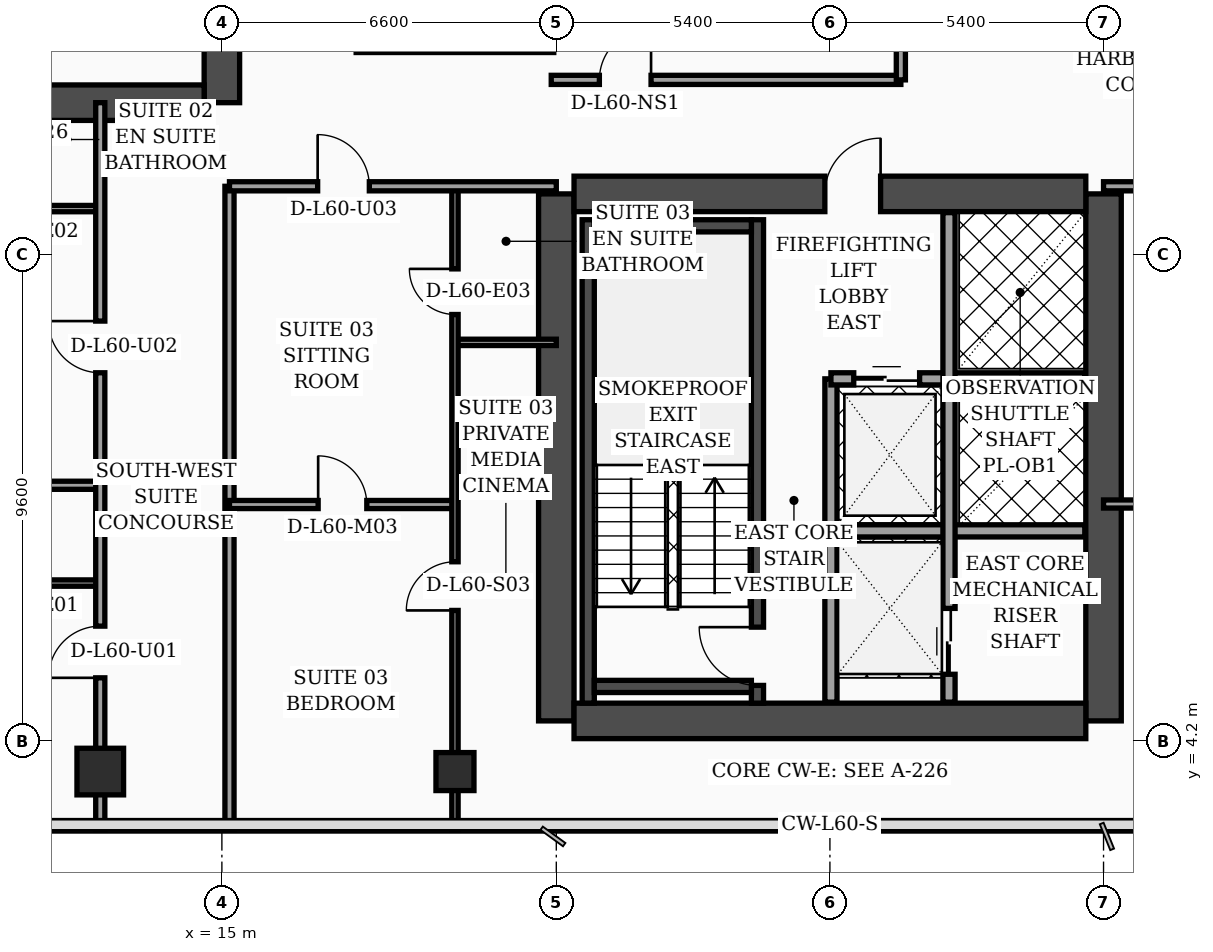
"""IFC4 building model, lengths in metres.
Left out: names, types, materials, properties, quantities, classifications, styles, units other than length and angle.
Written with IfcOpenShell. Run it as: python <this file> out.ifc"""

import sys

from ifc_helpers import new_model, si_unit, direction, frame, frame_2d, origin, origin_2d, place, context, subcontext, project, spatial, rectangle, hollow_rectangle, extrude, element, fill, save


model = new_model("IFC4")
c1 = context("Model", 3, precision=1e-05, world=origin(), true_north=direction((0.0, 1.0)))
c2 = subcontext(c1, "Body", "Model", "MODEL_VIEW")
j1 = project(units=[si_unit("LENGTHUNIT", "METRE"), si_unit("PLANEANGLEUNIT", "RADIAN")], contexts=[c1])
p1 = place(None, origin())
s1 = spatial("IfcSite", under=j1, at=p1, CompositionType="ELEMENT")
p2 = place(p1, origin())
s2 = spatial("IfcBuilding", under=s1, at=p2, CompositionType="ELEMENT")
p3 = place(p2, frame((0.0, 0.0, 243.8)))
s3 = spatial("IfcBuildingStorey", under=s2, at=p3, CompositionType="ELEMENT", Elevation=243.8)
p4 = place(p3, frame((15.0, 16.8, 0.0), z_axis=(0.0, 0.0, 1.0), x_axis=(0.0, 1.0, 0.0)))
e1 = element("IfcWall", 1, at=p4, inside=s3, PredefinedType="SHEAR", context=c2, shape_type="SweptSolid", body=[
    extrude(rectangle(XDim=21.6, YDim=0.7, at=frame_2d((10.8, 0.0))), origin(), (0.0, 0.0, 1.0), 3.56),
])
p5 = place(p4, frame((8.65, 0.0, 0.0)))
e2 = element("IfcOpeningElement", 2, at=p5, cuts=e1, PredefinedType="OPENING", context=c2, shape_type="SweptSolid", body=[
    extrude(rectangle(XDim=1.1, YDim=2.2, at=frame_2d((0.55, 1.1))), frame((0.0, 0.36, 0.0), z_axis=(0.0, -1.0, 0.0), x_axis=(1.0, 0.0, 0.0)), (0.0, 0.0, 1.0), 0.72),
])
p6 = place(p4, frame((18.9, 0.0, 0.0)))
e3 = element("IfcOpeningElement", 3, at=p6, cuts=e1, PredefinedType="OPENING", context=c2, shape_type="SweptSolid", body=[
    extrude(rectangle(XDim=1.1, YDim=2.2, at=frame_2d((0.55, 1.1))), frame((0.0, 0.36, 0.0), z_axis=(0.0, -1.0, 0.0), x_axis=(1.0, 0.0, 0.0)), (0.0, 0.0, 1.0), 0.72),
])
p7 = place(p3, frame((4.55, 16.8, 0.0), z_axis=(0.0, 0.0, 1.0), x_axis=(1.0, 0.0, 0.0)))
e4 = element("IfcWall", 4, at=p7, inside=s3, PredefinedType="SHEAR", context=c2, shape_type="SweptSolid", body=[
    extrude(rectangle(XDim=10.1, YDim=0.7, at=frame_2d((5.05, 0.0))), origin(), (0.0, 0.0, 1.0), 3.56),
])
for number, where, z_axis, x_axis in (
    (5, (21.6, 4.6, 0.0), (0.0, 0.0, 1.0), (0.0, 1.0, 0.0)),
    (6, (32.4, 4.6, 0.0), (0.0, 0.0, 1.0), (0.0, 1.0, 0.0)),
):
    element("IfcWall", number, at=place(p3, frame(where, z_axis=z_axis, x_axis=x_axis)), inside=s3, PredefinedType="SHEAR", context=c2, shape_type="SweptSolid", body=[
        extrude(rectangle(XDim=10.4, YDim=0.7, at=frame_2d((5.2, 0.0))), origin(), (0.0, 0.0, 1.0), 3.56),
    ])
p8 = place(p3, frame((21.95, 15.0, 0.0), z_axis=(0.0, 0.0, 1.0), x_axis=(1.0, 0.0, 0.0)))
e7 = element("IfcWall", 7, at=p8, inside=s3, PredefinedType="SHEAR", context=c2, shape_type="SweptSolid", body=[
    extrude(rectangle(XDim=10.1, YDim=0.7, at=frame_2d((5.05, 0.0))), origin(), (0.0, 0.0, 1.0), 3.56),
])
p9 = place(p8, frame((4.95, 0.0, 0.0)))
e8 = element("IfcOpeningElement", 8, at=p9, cuts=e7, PredefinedType="OPENING", context=c2, shape_type="SweptSolid", body=[
    extrude(rectangle(XDim=1.1, YDim=2.2, at=frame_2d((0.55, 1.1))), frame((0.0, 0.36, 0.0), z_axis=(0.0, -1.0, 0.0), x_axis=(1.0, 0.0, 0.0)), (0.0, 0.0, 1.0), 0.72),
])
p10 = place(p3, frame((21.95, 4.6, 0.0), z_axis=(0.0, 0.0, 1.0), x_axis=(1.0, 0.0, 0.0)))
e9 = element("IfcWall", 9, at=p10, inside=s3, PredefinedType="SHEAR", context=c2, shape_type="SweptSolid", body=[
    extrude(rectangle(XDim=10.1, YDim=0.7, at=frame_2d((5.05, 0.0))), origin(), (0.0, 0.0, 1.0), 3.56),
])
p11 = place(p3, frame((22.23, 4.95, 0.0), z_axis=(0.0, 0.0, 1.0), x_axis=(0.0, 1.0, 0.0)))
e10 = element("IfcWall", 10, at=p11, inside=s3, PredefinedType="SOLIDWALL", context=c2, shape_type="SweptSolid", body=[
    extrude(rectangle(XDim=9.54, YDim=0.24, at=frame_2d((4.77, 0.0))), origin(), (0.0, 0.0, 1.0), 3.56),
])
p12 = place(p3, frame((25.57, 4.95, 0.0), z_axis=(0.0, 0.0, 1.0), x_axis=(0.0, 1.0, 0.0)))
e11 = element("IfcWall", 11, at=p12, inside=s3, PredefinedType="SOLIDWALL", context=c2, shape_type="SweptSolid", body=[
    extrude(rectangle(XDim=9.54, YDim=0.24, at=frame_2d((4.77, 0.0))), origin(), (0.0, 0.0, 1.0), 3.56),
])
p13 = place(p12, frame((0.35, 0.0, 0.0)))
e12 = element("IfcOpeningElement", 12, at=p13, cuts=e11, PredefinedType="OPENING", context=c2, shape_type="SweptSolid", body=[
    extrude(rectangle(XDim=1.15, YDim=2.2, at=frame_2d((0.575, 1.1))), frame((0.0, 0.13, 0.0), z_axis=(0.0, -1.0, 0.0), x_axis=(1.0, 0.0, 0.0)), (0.0, 0.0, 1.0), 0.26),
])
for number, where, z_axis, x_axis in (
    (13, (22.35, 5.28, 0.0), (0.0, 0.0, 1.0), (1.0, 0.0, 0.0)),
    (14, (22.35, 14.37, 0.0), (0.0, 0.0, 1.0), (1.0, 0.0, 0.0)),
):
    element("IfcWall", number, at=place(p3, frame(where, z_axis=z_axis, x_axis=x_axis)), inside=s3, PredefinedType="SOLIDWALL", context=c2, shape_type="SweptSolid", body=[
        extrude(rectangle(XDim=3.1, YDim=0.24, at=frame_2d((1.55, 0.0))), origin(), (0.0, 0.0, 1.0), 3.56),
    ])
p14 = place(p3, frame((12.6, 3.6, 0.0), z_axis=(0.0, 0.0, 1.0), x_axis=(1.0, 0.0, 0.0)))
e15 = element("IfcColumn", 15, at=p14, inside=s3, PredefinedType="COLUMN", context=c2, shape_type="SweptSolid", body=[
    extrude(rectangle(XDim=0.92, YDim=0.92, at=origin_2d()), origin(), (0.0, 0.0, 1.0), 3.56),
])
p15 = place(p3, frame((19.6, 3.6, 0.0), z_axis=(0.0, 0.0, 1.0), x_axis=(1.0, 0.0, 0.0)))
e16 = element("IfcColumn", 16, at=p15, inside=s3, PredefinedType="COLUMN", context=c2, shape_type="SweptSolid", body=[
    extrude(hollow_rectangle(XDim=0.75, YDim=0.75, WallThickness=0.032, at=origin_2d()), origin(), (0.0, 0.0, 1.0), 3.56),
])
p16 = place(p3, frame((27.02, 4.97, 0.0), z_axis=(0.0, 0.0, 1.0), x_axis=(0.0, 1.0, 0.0)))
e17 = element("IfcWall", 17, at=p16, inside=s3, PredefinedType="SOLIDWALL", context=c2, shape_type="SweptSolid", body=[
    extrude(rectangle(XDim=6.38, YDim=0.24, at=frame_2d((3.19, 0.0))), origin(), (0.0, 0.0, 1.0), 3.56),
])
p17 = place(p3, frame((27.02, 11.35, 0.0), z_axis=(0.0, 0.0, 1.0), x_axis=(1.0, 0.0, 0.0)))
e18 = element("IfcWall", 18, at=p17, inside=s3, PredefinedType="SOLIDWALL", context=c2, shape_type="SweptSolid", body=[
    extrude(rectangle(XDim=5.01, YDim=0.24, at=frame_2d((2.505, 0.0))), origin(), (0.0, 0.0, 1.0), 3.56),
])
p18 = place(p17, frame((0.45, 0.0, 0.0)))
e19 = element("IfcOpeningElement", 19, at=p18, cuts=e18, PredefinedType="OPENING", context=c2, shape_type="SweptSolid", body=[
    extrude(rectangle(XDim=1.3, YDim=2.35, at=frame_2d((0.65, 1.175))), frame((0.0, 0.13, 0.0), z_axis=(0.0, -1.0, 0.0), x_axis=(1.0, 0.0, 0.0)), (0.0, 0.0, 1.0), 0.26),
])
p19 = place(p3, frame((27.02, 8.35, 0.0), z_axis=(0.0, 0.0, 1.0), x_axis=(1.0, 0.0, 0.0)))
e20 = element("IfcWall", 20, at=p19, inside=s3, PredefinedType="SOLIDWALL", context=c2, shape_type="SweptSolid", body=[
    extrude(rectangle(XDim=5.01, YDim=0.24, at=frame_2d((2.505, 0.0))), origin(), (0.0, 0.0, 1.0), 3.56),
])
p20 = place(p3, frame((29.35, 4.97, 0.0), z_axis=(0.0, 0.0, 1.0), x_axis=(0.0, 1.0, 0.0)))
e21 = element("IfcWall", 21, at=p20, inside=s3, PredefinedType="SOLIDWALL", context=c2, shape_type="SweptSolid", body=[
    extrude(rectangle(XDim=9.66, YDim=0.24, at=frame_2d((4.83, 0.0))), origin(), (0.0, 0.0, 1.0), 3.56),
])
p21 = place(p20, frame((0.55, 0.0, 0.0)))
e22 = element("IfcOpeningElement", 22, at=p21, cuts=e21, PredefinedType="OPENING", context=c2, shape_type="SweptSolid", body=[
    extrude(rectangle(XDim=1.3, YDim=2.35, at=frame_2d((0.65, 1.175))), frame((0.0, 0.13, 0.0), z_axis=(0.0, -1.0, 0.0), x_axis=(1.0, 0.0, 0.0)), (0.0, 0.0, 1.0), 0.26),
])
p22 = place(p3, frame((3.2, 7.32, 0.0), z_axis=(0.0, 0.0, 1.0), x_axis=(1.0, 0.0, 0.0)))
e23 = element("IfcWall", 23, at=p22, inside=s3, PredefinedType="PARTITIONING", context=c2, shape_type="SweptSolid", body=[
    extrude(rectangle(XDim=9.4, YDim=0.125, at=frame_2d((4.7, 0.0))), origin(), (0.0, 0.0, 1.0), 2.99),
])
p23 = place(p22, frame((3.3, 0.0, 0.0)))
e24 = element("IfcOpeningElement", 24, at=p23, cuts=e23, PredefinedType="OPENING", context=c2, shape_type="SweptSolid", body=[
    extrude(rectangle(XDim=0.96, YDim=2.2, at=frame_2d((0.48, 1.1))), frame((0.0, 0.073, 0.0), z_axis=(0.0, -1.0, 0.0), x_axis=(1.0, 0.0, 0.0)), (0.0, 0.0, 1.0), 0.145),
])
p24 = place(p22, frame((7.49, 0.0, 0.0)))
e25 = element("IfcOpeningElement", 25, at=p24, cuts=e23, PredefinedType="OPENING", context=c2, shape_type="SweptSolid", body=[
    extrude(rectangle(XDim=0.9, YDim=2.15, at=frame_2d((0.45, 1.075))), frame((0.0, 0.073, 0.0), z_axis=(0.0, -1.0, 0.0), x_axis=(1.0, 0.0, 0.0)), (0.0, 0.0, 1.0), 0.145),
])
p25 = place(p3, frame((0.08, 14.71, 0.0), z_axis=(0.0, 0.0, 1.0), x_axis=(1.0, 0.0, 0.0)))
e26 = element("IfcWall", 26, at=p25, inside=s3, PredefinedType="PARTITIONING", context=c2, shape_type="SweptSolid", body=[
    extrude(rectangle(XDim=12.52, YDim=0.125, at=frame_2d((6.26, 0.0))), origin(), (0.0, 0.0, 1.0), 2.99),
])
p26 = place(p25, frame((4.32, 0.0, 0.0)))
e27 = element("IfcOpeningElement", 27, at=p26, cuts=e26, PredefinedType="OPENING", context=c2, shape_type="SweptSolid", body=[
    extrude(rectangle(XDim=0.96, YDim=2.2, at=frame_2d((0.48, 1.1))), frame((0.0, 0.073, 0.0), z_axis=(0.0, -1.0, 0.0), x_axis=(1.0, 0.0, 0.0)), (0.0, 0.0, 1.0), 0.145),
])
p27 = place(p25, frame((10.61, 0.0, 0.0)))
e28 = element("IfcOpeningElement", 28, at=p27, cuts=e26, PredefinedType="OPENING", context=c2, shape_type="SweptSolid", body=[
    extrude(rectangle(XDim=0.9, YDim=2.15, at=frame_2d((0.45, 1.075))), frame((0.0, 0.073, 0.0), z_axis=(0.0, -1.0, 0.0), x_axis=(1.0, 0.0, 0.0)), (0.0, 0.0, 1.0), 0.145),
])
p28 = place(p3, frame((0.08, 9.25, 0.0), z_axis=(0.0, 0.0, 1.0), x_axis=(1.0, 0.0, 0.0)))
e29 = element("IfcWall", 29, at=p28, inside=s3, PredefinedType="PARTITIONING", context=c2, shape_type="SweptSolid", body=[
    extrude(rectangle(XDim=12.52, YDim=0.16, at=frame_2d((6.26, 0.0))), origin(), (0.0, 0.0, 1.0), 2.99),
])
p29 = place(p3, frame((12.6, 2.44, 0.0), z_axis=(0.0, 0.0, 1.0), x_axis=(0.0, 1.0, 0.0)))
e30 = element("IfcWall", 30, at=p29, inside=s3, PredefinedType="PARTITIONING", context=c2, shape_type="SweptSolid", body=[
    extrude(rectangle(XDim=14.36, YDim=0.18, at=frame_2d((7.18, 0.0))), origin(), (0.0, 0.0, 1.0), 2.99),
])
p30 = place(p29, frame((3.01, 0.0, 0.0)))
e31 = element("IfcOpeningElement", 31, at=p30, cuts=e30, PredefinedType="OPENING", context=c2, shape_type="SweptSolid", body=[
    extrude(rectangle(XDim=1.02, YDim=2.2, at=frame_2d((0.51, 1.1))), frame((0.0, 0.1, 0.0), z_axis=(0.0, -1.0, 0.0), x_axis=(1.0, 0.0, 0.0)), (0.0, 0.0, 1.0), 0.2),
])
p31 = place(p29, frame((9.03, 0.0, 0.0)))
e32 = element("IfcOpeningElement", 32, at=p31, cuts=e30, PredefinedType="OPENING", context=c2, shape_type="SweptSolid", body=[
    extrude(rectangle(XDim=1.02, YDim=2.2, at=frame_2d((0.51, 1.1))), frame((0.0, 0.1, 0.0), z_axis=(0.0, -1.0, 0.0), x_axis=(1.0, 0.0, 0.0)), (0.0, 0.0, 1.0), 0.2),
])
p32 = place(p3, frame((15.15, 2.44, 0.0), z_axis=(0.0, 0.0, 1.0), x_axis=(0.0, 1.0, 0.0)))
e33 = element("IfcWall", 33, at=p32, inside=s3, PredefinedType="PARTITIONING", context=c2, shape_type="SweptSolid", body=[
    extrude(rectangle(XDim=12.71, YDim=0.18, at=frame_2d((6.355, 0.0))), origin(), (0.0, 0.0, 1.0), 3.09),
])
p33 = place(p3, frame((19.6, 12.07, 0.0), z_axis=(0.0, 0.0, 1.0), x_axis=(1.0, 0.0, 0.0)))
e34 = element("IfcWall", 34, at=p33, inside=s3, PredefinedType="PARTITIONING", context=c2, shape_type="SweptSolid", body=[
    extrude(rectangle(XDim=2.0, YDim=0.125, at=frame_2d((1.0, 0.0))), origin(), (0.0, 0.0, 1.0), 3.56),
])
p34 = place(p3, frame((15.15, 8.87, 0.0), z_axis=(0.0, 0.0, 1.0), x_axis=(1.0, 0.0, 0.0)))
e35 = element("IfcWall", 35, at=p34, inside=s3, PredefinedType="PARTITIONING", context=c2, shape_type="SweptSolid", body=[
    extrude(rectangle(XDim=4.45, YDim=0.16, at=frame_2d((2.225, 0.0))), origin(), (0.0, 0.0, 1.0), 3.56),
])
p35 = place(p34, frame((1.75, 0.0, 0.0)))
e36 = element("IfcOpeningElement", 36, at=p35, cuts=e35, PredefinedType="OPENING", context=c2, shape_type="SweptSolid", body=[
    extrude(rectangle(XDim=0.96, YDim=2.2, at=frame_2d((0.48, 1.1))), frame((0.0, 0.09, 0.0), z_axis=(0.0, -1.0, 0.0), x_axis=(1.0, 0.0, 0.0)), (0.0, 0.0, 1.0), 0.18),
])
p36 = place(p3, frame((19.6, 2.44, 0.0), z_axis=(0.0, 0.0, 1.0), x_axis=(0.0, 1.0, 0.0)))
e37 = element("IfcWall", 37, at=p36, inside=s3, PredefinedType="PARTITIONING", context=c2, shape_type="SweptSolid", body=[
    extrude(rectangle(XDim=12.71, YDim=0.125, at=frame_2d((6.355, 0.0))), origin(), (0.0, 0.0, 1.0), 2.59),
])
p37 = place(p36, frame((4.34, 0.0, 0.0)))
e38 = element("IfcOpeningElement", 38, at=p37, cuts=e37, PredefinedType="OPENING", context=c2, shape_type="SweptSolid", body=[
    extrude(rectangle(XDim=0.96, YDim=2.2, at=frame_2d((0.48, 1.1))), frame((0.0, 0.073, 0.0), z_axis=(0.0, -1.0, 0.0), x_axis=(1.0, 0.0, 0.0)), (0.0, 0.0, 1.0), 0.145),
])
p38 = place(p36, frame((10.18, 0.0, 0.0)))
e39 = element("IfcOpeningElement", 39, at=p38, cuts=e37, PredefinedType="OPENING", context=c2, shape_type="SweptSolid", body=[
    extrude(rectangle(XDim=0.9, YDim=2.15, at=frame_2d((0.45, 1.075))), frame((0.0, 0.073, 0.0), z_axis=(0.0, -1.0, 0.0), x_axis=(1.0, 0.0, 0.0)), (0.0, 0.0, 1.0), 0.145),
])
p39 = place(p3, frame((15.15, 15.15, 0.0), z_axis=(0.0, 0.0, 1.0), x_axis=(1.0, 0.0, 0.0)))
e40 = element("IfcWall", 40, at=p39, inside=s3, PredefinedType="PARTITIONING", context=c2, shape_type="SweptSolid", body=[
    extrude(rectangle(XDim=6.45, YDim=0.18, at=frame_2d((3.225, 0.0))), origin(), (0.0, 0.0, 1.0), 2.59),
])
p40 = place(p39, frame((1.74, 0.0, 0.0)))
e41 = element("IfcOpeningElement", 41, at=p40, cuts=e40, PredefinedType="OPENING", context=c2, shape_type="SweptSolid", body=[
    extrude(rectangle(XDim=1.02, YDim=2.2, at=frame_2d((0.51, 1.1))), frame((0.0, 0.1, 0.0), z_axis=(0.0, -1.0, 0.0), x_axis=(1.0, 0.0, 0.0)), (0.0, 0.0, 1.0), 0.2),
])
p41 = place(p3, frame((17.65, 17.88, 0.0), z_axis=(0.0, 0.0, 1.0), x_axis=(1.0, 0.0, 0.0)))
e42 = element("IfcWall", 42, at=p41, inside=s3, PredefinedType="PARTITIONING", context=c2, shape_type="SweptSolid", body=[
    extrude(rectangle(XDim=3.9, YDim=0.18, at=frame_2d((1.95, 0.0))), origin(), (0.0, 0.0, 1.0), 3.09),
])
p42 = place(p3, frame((32.4, 8.88, 0.0), z_axis=(0.0, 0.0, 1.0), x_axis=(1.0, 0.0, 0.0)))
e43 = element("IfcWall", 43, at=p42, inside=s3, PredefinedType="PARTITIONING", context=c2, shape_type="SweptSolid", body=[
    extrude(rectangle(XDim=5.2, YDim=0.16, at=frame_2d((2.6, 0.0))), origin(), (0.0, 0.0, 1.0), 2.99),
])
p43 = place(p42, frame((2.12, 0.0, 0.0)))
e44 = element("IfcOpeningElement", 44, at=p43, cuts=e43, PredefinedType="OPENING", context=c2, shape_type="SweptSolid", body=[
    extrude(rectangle(XDim=0.96, YDim=2.2, at=frame_2d((0.48, 1.1))), frame((0.0, 0.09, 0.0), z_axis=(0.0, -1.0, 0.0), x_axis=(1.0, 0.0, 0.0)), (0.0, 0.0, 1.0), 0.18),
])
p44 = place(p3, frame((32.4, 15.15, 0.0), z_axis=(0.0, 0.0, 1.0), x_axis=(1.0, 0.0, 0.0)))
e45 = element("IfcWall", 45, at=p44, inside=s3, PredefinedType="PARTITIONING", context=c2, shape_type="SweptSolid", body=[
    extrude(rectangle(XDim=7.2, YDim=0.18, at=frame_2d((3.6, 0.0))), origin(), (0.0, 0.0, 1.0), 2.99),
])
p45 = place(p44, frame((2.19, 0.0, 0.0)))
e46 = element("IfcOpeningElement", 46, at=p45, cuts=e45, PredefinedType="OPENING", context=c2, shape_type="SweptSolid", body=[
    extrude(rectangle(XDim=1.02, YDim=2.2, at=frame_2d((0.51, 1.1))), frame((0.0, 0.1, 0.0), z_axis=(0.0, -1.0, 0.0), x_axis=(1.0, 0.0, 0.0)), (0.0, 0.0, 1.0), 0.2),
])
p46 = place(p3, frame((21.5, 17.25, 0.0), z_axis=(0.0, 0.0, 1.0), x_axis=(1.0, 0.0, 0.0)))
e47 = element("IfcWall", 47, at=p46, inside=s3, PredefinedType="PARTITIONING", context=c2, shape_type="SweptSolid", body=[
    extrude(rectangle(XDim=6.9, YDim=0.18, at=frame_2d((3.45, 0.0))), origin(), (0.0, 0.0, 1.0), 2.99),
])
p47 = place(p46, frame((0.95, 0.0, 0.0)))
e48 = element("IfcOpeningElement", 48, at=p47, cuts=e47, PredefinedType="OPENING", context=c2, shape_type="SweptSolid", body=[
    extrude(rectangle(XDim=1.02, YDim=2.2, at=frame_2d((0.51, 1.1))), frame((0.0, 0.1, 0.0), z_axis=(0.0, -1.0, 0.0), x_axis=(1.0, 0.0, 0.0)), (0.0, 0.0, 1.0), 0.2),
])
p48 = place(p3, frame((28.4, 17.25, 0.0), z_axis=(0.0, 0.0, 1.0), x_axis=(0.0, 1.0, 0.0)))
e49 = element("IfcWall", 49, at=p48, inside=s3, PredefinedType="PARTITIONING", context=c2, shape_type="SweptSolid", body=[
    extrude(rectangle(XDim=15.07, YDim=0.18, at=frame_2d((7.535, 0.0))), origin(), (0.0, 0.0, 1.0), 2.99),
])
p49 = place(p18, origin())
e50 = element("IfcDoor", 50, at=p49, inside=s3, OperationType="DOUBLE_DOOR_SLIDING", PredefinedType="DOOR", context=c2, shape_type="SweptSolid", body=[
    extrude(rectangle(XDim=1.3, YDim=2.35, at=frame_2d((0.65, 1.175))), frame((0.0, 0.025, 0.0), z_axis=(0.0, -1.0, 0.0), x_axis=(1.0, 0.0, 0.0)), (0.0, 0.0, 1.0), 0.05),
])
fill(e19, e50)
p50 = place(p21, origin())
e51 = element("IfcDoor", 51, at=p50, inside=s3, OperationType="DOUBLE_DOOR_SLIDING", PredefinedType="DOOR", context=c2, shape_type="SweptSolid", body=[
    extrude(rectangle(XDim=1.3, YDim=2.35, at=frame_2d((0.65, 1.175))), frame((0.0, 0.025, 0.0), z_axis=(0.0, -1.0, 0.0), x_axis=(1.0, 0.0, 0.0)), (0.0, 0.0, 1.0), 0.05),
])
fill(e22, e51)
p51 = place(p30, origin())
e52 = element("IfcDoor", 52, at=p51, inside=s3, OperationType="SINGLE_SWING_LEFT", PredefinedType="DOOR", context=c2, shape_type="SweptSolid", body=[
    extrude(rectangle(XDim=1.02, YDim=2.2, at=frame_2d((0.51, 1.1))), frame((0.0, 0.025, 0.0), z_axis=(0.0, -1.0, 0.0), x_axis=(1.0, 0.0, 0.0)), (0.0, 0.0, 1.0), 0.05),
])
fill(e31, e52)
p52 = place(p31, origin())
e53 = element("IfcDoor", 53, at=p52, inside=s3, OperationType="SINGLE_SWING_RIGHT", PredefinedType="DOOR", context=c2, shape_type="SweptSolid", body=[
    extrude(rectangle(XDim=1.02, YDim=2.2, at=frame_2d((0.51, 1.1))), frame((0.0, 0.025, 0.0), z_axis=(0.0, -1.0, 0.0), x_axis=(1.0, 0.0, 0.0)), (0.0, 0.0, 1.0), 0.05),
])
fill(e32, e53)
p53 = place(p35, origin())
e54 = element("IfcDoor", 54, at=p53, inside=s3, OperationType="SINGLE_SWING_LEFT", PredefinedType="DOOR", context=c2, shape_type="SweptSolid", body=[
    extrude(rectangle(XDim=0.96, YDim=2.2, at=frame_2d((0.48, 1.1))), frame((0.0, 0.025, 0.0), z_axis=(0.0, -1.0, 0.0), x_axis=(1.0, 0.0, 0.0)), (0.0, 0.0, 1.0), 0.05),
])
fill(e36, e54)
p54 = place(p37, origin())
e55 = element("IfcDoor", 55, at=p54, inside=s3, OperationType="SINGLE_SWING_LEFT", PredefinedType="DOOR", context=c2, shape_type="SweptSolid", body=[
    extrude(rectangle(XDim=0.96, YDim=2.2, at=frame_2d((0.48, 1.1))), frame((0.0, 0.025, 0.0), z_axis=(0.0, -1.0, 0.0), x_axis=(1.0, 0.0, 0.0)), (0.0, 0.0, 1.0), 0.05),
])
fill(e38, e55)
p55 = place(p38, origin())
e56 = element("IfcDoor", 56, at=p55, inside=s3, OperationType="SINGLE_SWING_RIGHT", PredefinedType="DOOR", context=c2, shape_type="SweptSolid", body=[
    extrude(rectangle(XDim=0.9, YDim=2.15, at=frame_2d((0.45, 1.075))), frame((0.0, 0.025, 0.0), z_axis=(0.0, -1.0, 0.0), x_axis=(1.0, 0.0, 0.0)), (0.0, 0.0, 1.0), 0.05),
])
fill(e39, e56)
p56 = place(p40, origin())
e57 = element("IfcDoor", 57, at=p56, inside=s3, OperationType="SINGLE_SWING_LEFT", PredefinedType="DOOR", context=c2, shape_type="SweptSolid", body=[
    extrude(rectangle(XDim=1.02, YDim=2.2, at=frame_2d((0.51, 1.1))), frame((0.0, 0.025, 0.0), z_axis=(0.0, -1.0, 0.0), x_axis=(1.0, 0.0, 0.0)), (0.0, 0.0, 1.0), 0.05),
])
fill(e41, e57)
p57 = place(p47, origin())
e58 = element("IfcDoor", 58, at=p57, inside=s3, OperationType="SINGLE_SWING_RIGHT", PredefinedType="DOOR", context=c2, shape_type="SweptSolid", body=[
    extrude(rectangle(XDim=1.02, YDim=2.2, at=frame_2d((0.51, 1.1))), frame((0.0, 0.025, 0.0), z_axis=(0.0, -1.0, 0.0), x_axis=(1.0, 0.0, 0.0)), (0.0, 0.0, 1.0), 0.05),
])
fill(e48, e58)
p58 = place(p13, origin())
e59 = element("IfcDoor", 59, at=p58, inside=s3, OperationType="SINGLE_SWING_RIGHT", PredefinedType="DOOR", context=c2, shape_type="SweptSolid", body=[
    extrude(rectangle(XDim=1.15, YDim=2.2, at=frame_2d((0.575, 1.1))), frame((0.0, 0.025, 0.0), z_axis=(0.0, -1.0, 0.0), x_axis=(1.0, 0.0, 0.0)), (0.0, 0.0, 1.0), 0.05),
])
fill(e12, e59)
p59 = place(p9, origin())
e60 = element("IfcDoor", 60, at=p59, inside=s3, OperationType="SINGLE_SWING_RIGHT", PredefinedType="DOOR", context=c2, shape_type="SweptSolid", body=[
    extrude(rectangle(XDim=1.1, YDim=2.2, at=frame_2d((0.55, 1.1))), frame((0.0, 0.025, 0.0), z_axis=(0.0, -1.0, 0.0), x_axis=(1.0, 0.0, 0.0)), (0.0, 0.0, 1.0), 0.05),
])
fill(e8, e60)
save(model, sys.argv[1])
